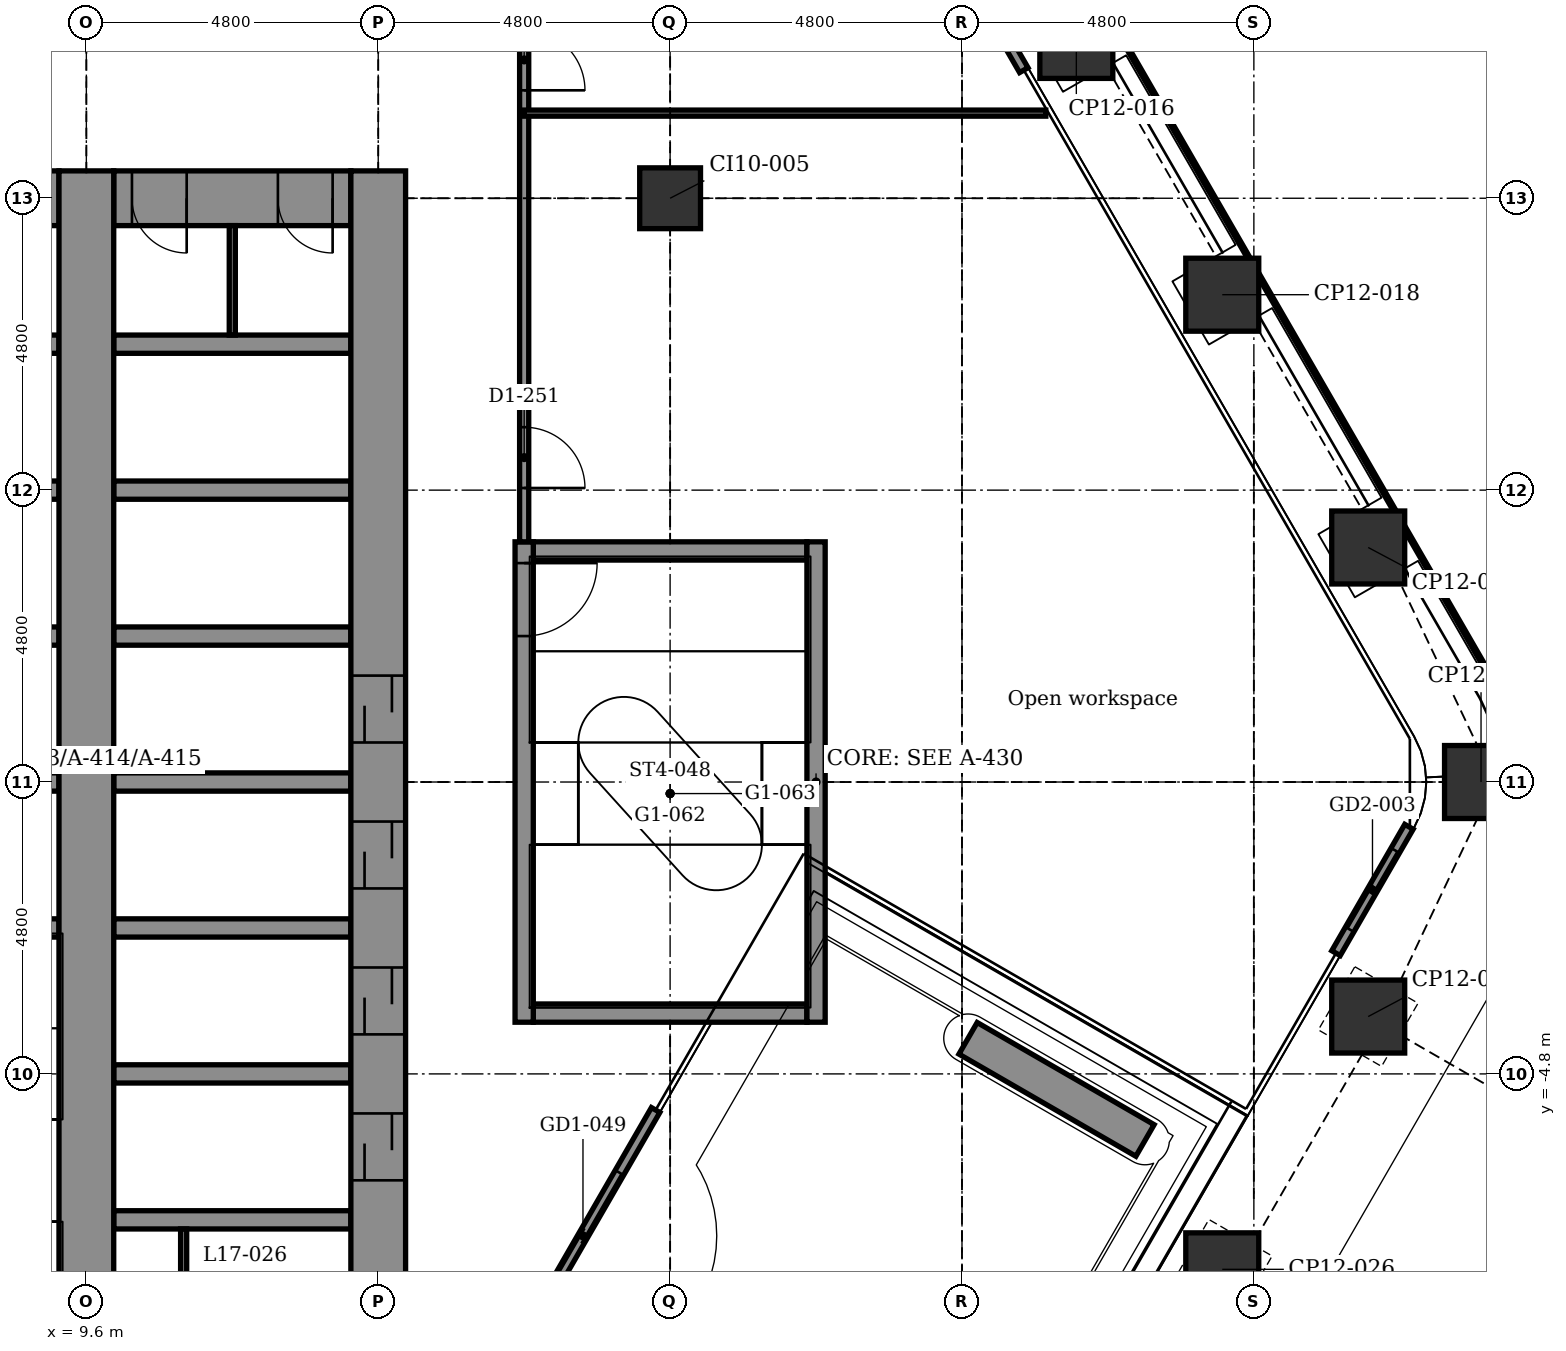
"""IFC4 building model, lengths in metres.
Left out: names, types, materials, properties, quantities, classifications, styles, units other than length and angle.
Written with IfcOpenShell. Run it as: python <this file> out.ifc"""

import sys

from ifc_helpers import new_model, si_unit, direction, frame, frame_2d, origin, origin_2d, place, context, subcontext, project, spatial, rectangle, extrude, element, fill, save


model = new_model("IFC4")
c1 = context("Model", 3, precision=1e-05, world=origin(), true_north=direction((0.0, 1.0)))
c2 = subcontext(c1, "Body", "Model", "MODEL_VIEW")
j1 = project(units=[si_unit("LENGTHUNIT", "METRE"), si_unit("PLANEANGLEUNIT", "RADIAN")], contexts=[c1])
p1 = place(None, origin())
s1 = spatial("IfcSite", under=j1, at=p1, CompositionType="ELEMENT")
p2 = place(p1, origin())
s2 = spatial("IfcBuilding", under=s1, at=p2, CompositionType="ELEMENT")
p3 = place(p2, frame((0.0, 0.0, 91.4)))
s3 = spatial("IfcBuildingStorey", under=s2, at=p3, CompositionType="ELEMENT", Elevation=91.4)
for number, where, z_axis, x_axis in (
    (1, (25.88, 12.171, -0.2), (0.0, 0.0, 1.0), (0.866, 0.5, 0.0)),
    (2, (28.28, 8.014, -0.2), (0.0, 0.0, 1.0), (0.866, 0.5, 0.0)),
    (3, (30.68, 3.857, -0.2), (0.0, 0.0, 1.0), (0.866, 0.5, 0.0)),
    (4, (32.536, 0.0, -0.2), (0.0, 0.0, 1.0), (1.0, 0.0, 0.0)),
    (5, (30.68, -3.857, -0.2), (0.0, 0.0, 1.0), (0.5, 0.866, 0.0)),
    (6, (28.28, -8.014, -0.2), (0.0, 0.0, 1.0), (0.5, 0.866, 0.0)),
):
    element("IfcColumn", number, at=place(p3, frame(where, z_axis=z_axis, x_axis=x_axis)), inside=s3, PredefinedType="COLUMN", context=c2, shape_type="SweptSolid", body=[
        extrude(rectangle(XDim=1.2, YDim=1.2, at=origin_2d()), origin(), (0.0, 0.0, 1.0), 4.5),
    ])
p4 = place(p3, frame((19.2, 9.6, -0.2), z_axis=(0.0, 0.0, 1.0), x_axis=(1.0, 0.0, 0.0)))
e7 = element("IfcColumn", 7, at=p4, inside=s3, PredefinedType="COLUMN", context=c2, shape_type="SweptSolid", body=[
    extrude(rectangle(XDim=1.0, YDim=1.0, at=origin_2d()), origin(), (0.0, 0.0, 1.0), 4.5),
])
for number, where, z_axis, x_axis in (
    (8, (10.05, -7.2, -0.2), (0.0, 0.0, 1.0), (1.0, 0.0, 0.0)),
    (9, (10.05, -4.8, -0.2), (0.0, 0.0, 1.0), (1.0, 0.0, 0.0)),
):
    element("IfcWall", number, at=place(p3, frame(where, z_axis=z_axis, x_axis=x_axis)), inside=s3, PredefinedType="STANDARD", context=c2, shape_type="SweptSolid", body=[
        extrude(rectangle(XDim=3.9, YDim=0.3, at=frame_2d((1.95, 0.0))), origin(), (0.0, 0.0, 1.0), 4.5),
    ])
p5 = place(p3, frame((16.95, -3.8, -0.2), z_axis=(0.0, 0.0, 1.0), x_axis=(1.0, 0.0, 0.0)))
e10 = element("IfcWall", 10, at=p5, inside=s3, PredefinedType="STANDARD", context=c2, shape_type="SweptSolid", body=[
    extrude(rectangle(XDim=4.5, YDim=0.3, at=frame_2d((2.25, 0.0))), origin(), (0.0, 0.0, 1.0), 4.5),
])
p6 = place(p3, frame((6.15, -2.4, -0.2), z_axis=(0.0, 0.0, 1.0), x_axis=(1.0, 0.0, 0.0)))
e11 = element("IfcWall", 11, at=p6, inside=s3, PredefinedType="STANDARD", context=c2, shape_type="SweptSolid", body=[
    extrude(rectangle(XDim=3.0, YDim=0.3, at=frame_2d((1.5, 0.0))), origin(), (0.0, 0.0, 1.0), 4.5),
])
p7 = place(p3, frame((10.05, -2.4, -0.2), z_axis=(0.0, 0.0, 1.0), x_axis=(1.0, 0.0, 0.0)))
e12 = element("IfcWall", 12, at=p7, inside=s3, PredefinedType="STANDARD", context=c2, shape_type="SweptSolid", body=[
    extrude(rectangle(XDim=3.9, YDim=0.3, at=frame_2d((1.95, 0.0))), origin(), (0.0, 0.0, 1.0), 4.5),
])
p8 = place(p3, frame((6.15, 0.0, -0.2), z_axis=(0.0, 0.0, 1.0), x_axis=(1.0, 0.0, 0.0)))
e13 = element("IfcWall", 13, at=p8, inside=s3, PredefinedType="STANDARD", context=c2, shape_type="SweptSolid", body=[
    extrude(rectangle(XDim=3.0, YDim=0.3, at=frame_2d((1.5, 0.0))), origin(), (0.0, 0.0, 1.0), 4.5),
])
p9 = place(p3, frame((10.05, 0.0, -0.2), z_axis=(0.0, 0.0, 1.0), x_axis=(1.0, 0.0, 0.0)))
e14 = element("IfcWall", 14, at=p9, inside=s3, PredefinedType="STANDARD", context=c2, shape_type="SweptSolid", body=[
    extrude(rectangle(XDim=3.9, YDim=0.3, at=frame_2d((1.95, 0.0))), origin(), (0.0, 0.0, 1.0), 4.5),
])
p10 = place(p3, frame((6.15, 2.4, -0.2), z_axis=(0.0, 0.0, 1.0), x_axis=(1.0, 0.0, 0.0)))
e15 = element("IfcWall", 15, at=p10, inside=s3, PredefinedType="STANDARD", context=c2, shape_type="SweptSolid", body=[
    extrude(rectangle(XDim=3.0, YDim=0.3, at=frame_2d((1.5, 0.0))), origin(), (0.0, 0.0, 1.0), 4.5),
])
p11 = place(p3, frame((10.05, 2.4, -0.2), z_axis=(0.0, 0.0, 1.0), x_axis=(1.0, 0.0, 0.0)))
e16 = element("IfcWall", 16, at=p11, inside=s3, PredefinedType="STANDARD", context=c2, shape_type="SweptSolid", body=[
    extrude(rectangle(XDim=3.9, YDim=0.3, at=frame_2d((1.95, 0.0))), origin(), (0.0, 0.0, 1.0), 4.5),
])
p12 = place(p3, frame((16.95, 3.8, -0.2), z_axis=(0.0, 0.0, 1.0), x_axis=(1.0, 0.0, 0.0)))
e17 = element("IfcWall", 17, at=p12, inside=s3, PredefinedType="STANDARD", context=c2, shape_type="SweptSolid", body=[
    extrude(rectangle(XDim=4.5, YDim=0.3, at=frame_2d((2.25, 0.0))), origin(), (0.0, 0.0, 1.0), 4.5),
])
p13 = place(p3, frame((6.15, 4.8, -0.2), z_axis=(0.0, 0.0, 1.0), x_axis=(1.0, 0.0, 0.0)))
e18 = element("IfcWall", 18, at=p13, inside=s3, PredefinedType="STANDARD", context=c2, shape_type="SweptSolid", body=[
    extrude(rectangle(XDim=3.0, YDim=0.3, at=frame_2d((1.5, 0.0))), origin(), (0.0, 0.0, 1.0), 4.5),
])
p14 = place(p3, frame((10.05, 4.8, -0.2), z_axis=(0.0, 0.0, 1.0), x_axis=(1.0, 0.0, 0.0)))
e19 = element("IfcWall", 19, at=p14, inside=s3, PredefinedType="STANDARD", context=c2, shape_type="SweptSolid", body=[
    extrude(rectangle(XDim=3.9, YDim=0.3, at=frame_2d((1.95, 0.0))), origin(), (0.0, 0.0, 1.0), 4.5),
])
p15 = place(p3, frame((6.0, 7.2, -0.2), z_axis=(0.0, 0.0, 1.0), x_axis=(1.0, 0.0, 0.0)))
e20 = element("IfcWall", 20, at=p15, inside=s3, PredefinedType="STANDARD", context=c2, shape_type="SweptSolid", body=[
    extrude(rectangle(XDim=3.15, YDim=0.3, at=frame_2d((1.575, 0.0))), origin(), (0.0, 0.0, 1.0), 4.5),
])
p16 = place(p3, frame((10.05, 7.2, -0.2), z_axis=(0.0, 0.0, 1.0), x_axis=(1.0, 0.0, 0.0)))
e21 = element("IfcWall", 21, at=p16, inside=s3, PredefinedType="STANDARD", context=c2, shape_type="SweptSolid", body=[
    extrude(rectangle(XDim=3.9, YDim=0.3, at=frame_2d((1.95, 0.0))), origin(), (0.0, 0.0, 1.0), 4.5),
])
p17 = place(p3, frame((-5.25, 9.6, -0.2), z_axis=(0.0, 0.0, 1.0), x_axis=(1.0, 0.0, 0.0)))
e22 = element("IfcWall", 22, at=p17, inside=s3, PredefinedType="SHEAR", context=c2, shape_type="SweptSolid", body=[
    extrude(rectangle(XDim=14.4, YDim=0.9, at=frame_2d((7.2, 0.0))), origin(), (0.0, 0.0, 1.0), 4.5),
])
p18 = place(p17, frame((9.35, 0.0, 0.2)))
e23 = element("IfcOpeningElement", 23, at=p18, cuts=e22, PredefinedType="OPENING", context=c2, shape_type="SweptSolid", body=[
    extrude(rectangle(XDim=1.4, YDim=2.1, at=frame_2d((0.7, 1.05))), frame((0.0, 0.46, 0.0), z_axis=(0.0, -1.0, 0.0), x_axis=(1.0, 0.0, 0.0)), (0.0, 0.0, 1.0), 0.92),
])
p19 = place(p3, frame((10.05, 9.6, -0.2), z_axis=(0.0, 0.0, 1.0), x_axis=(1.0, 0.0, 0.0)))
e24 = element("IfcWall", 24, at=p19, inside=s3, PredefinedType="SHEAR", context=c2, shape_type="SweptSolid", body=[
    extrude(rectangle(XDim=3.9, YDim=0.9, at=frame_2d((1.95, 0.0))), origin(), (0.0, 0.0, 1.0), 4.5),
])
p20 = place(p19, frame((0.3, 0.0, 0.2)))
e25 = element("IfcOpeningElement", 25, at=p20, cuts=e24, PredefinedType="OPENING", context=c2, shape_type="SweptSolid", body=[
    extrude(rectangle(XDim=0.9, YDim=2.1, at=frame_2d((0.45, 1.05))), frame((0.0, 0.46, 0.0), z_axis=(0.0, -1.0, 0.0), x_axis=(1.0, 0.0, 0.0)), (0.0, 0.0, 1.0), 0.92),
])
p21 = place(p19, frame((2.7, 0.0, 0.2)))
e26 = element("IfcOpeningElement", 26, at=p21, cuts=e24, PredefinedType="OPENING", context=c2, shape_type="SweptSolid", body=[
    extrude(rectangle(XDim=0.9, YDim=2.1, at=frame_2d((0.45, 1.05))), frame((0.0, 0.46, 0.0), z_axis=(0.0, -1.0, 0.0), x_axis=(1.0, 0.0, 0.0)), (0.0, 0.0, 1.0), 0.92),
])
p22 = place(p3, frame((9.6, -10.15, -0.2), z_axis=(0.0, 0.0, 1.0), x_axis=(0.0, 1.0, 0.0)))
e27 = element("IfcWall", 27, at=p22, inside=s3, PredefinedType="SHEAR", context=c2, shape_type="SweptSolid", body=[
    extrude(rectangle(XDim=20.2, YDim=0.9, at=frame_2d((10.1, 0.0))), origin(), (0.0, 0.0, 1.0), 4.5),
])
p23 = place(p3, frame((14.4, -10.05, -0.2), z_axis=(0.0, 0.0, 1.0), x_axis=(0.0, 1.0, 0.0)))
e28 = element("IfcWall", 28, at=p23, inside=s3, PredefinedType="SHEAR", context=c2, shape_type="SweptSolid", body=[
    extrude(rectangle(XDim=20.1, YDim=0.9, at=frame_2d((10.05, 0.0))), origin(), (0.0, 0.0, 1.0), 4.5),
])
p24 = place(p23, frame((3.5, 0.0, 0.2)))
e29 = element("IfcOpeningElement", 29, at=p24, cuts=e28, PredefinedType="OPENING", context=c2, shape_type="SweptSolid", body=[
    extrude(rectangle(XDim=1.1, YDim=2.1, at=frame_2d((0.55, 1.05))), frame((0.0, 0.46, 0.0), z_axis=(0.0, -1.0, 0.0), x_axis=(1.0, 0.0, 0.0)), (0.0, 0.0, 1.0), 0.92),
])
p25 = place(p23, frame((5.9, 0.0, 0.2)))
e30 = element("IfcOpeningElement", 30, at=p25, cuts=e28, PredefinedType="OPENING", context=c2, shape_type="SweptSolid", body=[
    extrude(rectangle(XDim=1.1, YDim=2.1, at=frame_2d((0.55, 1.05))), frame((0.0, 0.46, 0.0), z_axis=(0.0, -1.0, 0.0), x_axis=(1.0, 0.0, 0.0)), (0.0, 0.0, 1.0), 0.92),
])
p26 = place(p23, frame((8.3, 0.0, 0.2)))
e31 = element("IfcOpeningElement", 31, at=p26, cuts=e28, PredefinedType="OPENING", context=c2, shape_type="SweptSolid", body=[
    extrude(rectangle(XDim=1.1, YDim=2.1, at=frame_2d((0.55, 1.05))), frame((0.0, 0.46, 0.0), z_axis=(0.0, -1.0, 0.0), x_axis=(1.0, 0.0, 0.0)), (0.0, 0.0, 1.0), 0.92),
])
p27 = place(p23, frame((10.7, 0.0, 0.2)))
e32 = element("IfcOpeningElement", 32, at=p27, cuts=e28, PredefinedType="OPENING", context=c2, shape_type="SweptSolid", body=[
    extrude(rectangle(XDim=1.1, YDim=2.1, at=frame_2d((0.55, 1.05))), frame((0.0, 0.46, 0.0), z_axis=(0.0, -1.0, 0.0), x_axis=(1.0, 0.0, 0.0)), (0.0, 0.0, 1.0), 0.92),
])
p28 = place(p3, frame((16.8, -3.95, -0.2), z_axis=(0.0, 0.0, 1.0), x_axis=(0.0, 1.0, 0.0)))
e33 = element("IfcWall", 33, at=p28, inside=s3, PredefinedType="STANDARD", context=c2, shape_type="SweptSolid", body=[
    extrude(rectangle(XDim=7.9, YDim=0.3, at=frame_2d((3.95, 0.0))), origin(), (0.0, 0.0, 1.0), 4.5),
])
p29 = place(p28, frame((6.35, 0.0, 0.2)))
e34 = element("IfcOpeningElement", 34, at=p29, cuts=e33, PredefinedType="OPENING", context=c2, shape_type="SweptSolid", body=[
    extrude(rectangle(XDim=1.2, YDim=2.1, at=frame_2d((0.6, 1.05))), frame((0.0, 0.16, 0.0), z_axis=(0.0, -1.0, 0.0), x_axis=(1.0, 0.0, 0.0)), (0.0, 0.0, 1.0), 0.32),
])
p30 = place(p3, frame((21.6, -3.95, -0.2), z_axis=(0.0, 0.0, 1.0), x_axis=(0.0, 1.0, 0.0)))
e35 = element("IfcWall", 35, at=p30, inside=s3, PredefinedType="STANDARD", context=c2, shape_type="SweptSolid", body=[
    extrude(rectangle(XDim=7.9, YDim=0.3, at=frame_2d((3.95, 0.0))), origin(), (0.0, 0.0, 1.0), 4.5),
])
p31 = place(p3, frame((22.647, 15.812, 0.0), z_axis=(0.0, 0.0, 1.0), x_axis=(0.499978080042, -0.866038058908, 0.0)))
e36 = element("IfcWall", 36, at=p31, inside=s3, PredefinedType="PARTITIONING", context=c2, shape_type="SweptSolid", body=[
    extrude(rectangle(XDim=4.74, YDim=0.16, at=frame_2d((2.37, 0.0))), origin(), (0.0, 0.0, 1.0), 4.3),
])
p32 = place(p31, frame((1.17, 0.0, 0.0)))
e37 = element("IfcOpeningElement", 37, at=p32, cuts=e36, PredefinedType="OPENING", context=c2, shape_type="SweptSolid", body=[
    extrude(rectangle(XDim=2.4, YDim=2.4, at=frame_2d((1.2, 1.2))), frame((0.0, 0.09, 0.0), z_axis=(0.0, -1.0, 0.0), x_axis=(1.0, 0.0, 0.0)), (0.0, 0.0, 1.0), 0.18),
])
p33 = place(p3, frame((31.351, -0.736, 0.0), z_axis=(0.0, 0.0, 1.0), x_axis=(-0.500001309137, -0.866024647952, 0.0)))
e38 = element("IfcWall", 38, at=p33, inside=s3, PredefinedType="PARTITIONING", context=c2, shape_type="SweptSolid", body=[
    extrude(rectangle(XDim=2.4, YDim=0.16, at=frame_2d((1.2, 0.0))), origin(), (0.0, 0.0, 1.0), 4.3),
])
p34 = place(p33, frame((0.45, 0.0, 0.0)))
e39 = element("IfcOpeningElement", 39, at=p34, cuts=e38, PredefinedType="OPENING", context=c2, shape_type="SweptSolid", body=[
    extrude(rectangle(XDim=1.5, YDim=2.4, at=frame_2d((0.75, 1.2))), frame((0.0, 0.09, 0.0), z_axis=(0.0, -1.0, 0.0), x_axis=(1.0, 0.0, 0.0)), (0.0, 0.0, 1.0), 0.18),
])
p35 = place(p3, frame((18.962, -5.394, 0.0), z_axis=(0.0, 0.0, 1.0), x_axis=(-0.500017192868, -0.86601547725, 0.0)))
e40 = element("IfcWall", 40, at=p35, inside=s3, PredefinedType="PARTITIONING", context=c2, shape_type="SweptSolid", body=[
    extrude(rectangle(XDim=4.78, YDim=0.16, at=frame_2d((2.39, 0.0))), origin(), (0.0, 0.0, 1.0), 4.3),
])
p36 = place(p35, frame((1.19, 0.0, 0.0)))
e41 = element("IfcOpeningElement", 41, at=p36, cuts=e40, PredefinedType="OPENING", context=c2, shape_type="SweptSolid", body=[
    extrude(rectangle(XDim=2.4, YDim=2.4, at=frame_2d((1.2, 1.2))), frame((0.0, 0.09, 0.0), z_axis=(0.0, -1.0, 0.0), x_axis=(1.0, 0.0, 0.0)), (0.0, 0.0, 1.0), 0.18),
])
p37 = place(p3, frame((24.1, -4.215, 0.0), z_axis=(0.0, 0.0, 1.0), x_axis=(0.866039179741, -0.499976138585, 0.0)))
e42 = element("IfcWall", 42, at=p37, inside=s3, PredefinedType="USERDEFINED", context=c2, shape_type="SweptSolid", body=[
    extrude(rectangle(XDim=3.36, YDim=0.6, at=frame_2d((1.68, 0.0))), origin(), (0.0, 0.0, 1.0), 0.7),
])
p38 = place(p3, frame((16.8, 3.95, 0.0), z_axis=(0.0, 0.0, 1.0), x_axis=(0.0, 1.0, 0.0)))
e43 = element("IfcWall", 43, at=p38, inside=s3, PredefinedType="PARTITIONING", context=c2, shape_type="SweptSolid", body=[
    extrude(rectangle(XDim=8.75, YDim=0.15, at=frame_2d((4.375, 0.0))), origin(), (0.0, 0.0, 1.0), 4.3),
])
p39 = place(p38, frame((7.425, 0.0, 0.0)))
e44 = element("IfcOpeningElement", 44, at=p39, cuts=e43, PredefinedType="OPENING", context=c2, shape_type="SweptSolid", body=[
    extrude(rectangle(XDim=1.0, YDim=2.1, at=frame_2d((0.5, 1.05))), frame((0.0, 0.085, 0.0), z_axis=(0.0, -1.0, 0.0), x_axis=(1.0, 0.0, 0.0)), (0.0, 0.0, 1.0), 0.17),
])
p40 = place(p38, frame((0.885, 0.0, 0.0)))
e45 = element("IfcOpeningElement", 45, at=p40, cuts=e43, PredefinedType="OPENING", context=c2, shape_type="SweptSolid", body=[
    extrude(rectangle(XDim=1.0, YDim=2.1, at=frame_2d((0.5, 1.05))), frame((0.0, 0.085, 0.0), z_axis=(0.0, -1.0, 0.0), x_axis=(1.0, 0.0, 0.0)), (0.0, 0.0, 1.0), 0.17),
])
for number, where, z_axis, x_axis in (
    (46, (12.0, 7.35, 0.0), (0.0, 0.0, 1.0), (0.0, 1.0, 0.0)),
    (47, (11.2, -9.15, 0.0), (0.0, 0.0, 1.0), (0.0, 1.0, 0.0)),
):
    element("IfcWall", number, at=place(p3, frame(where, z_axis=z_axis, x_axis=x_axis)), inside=s3, PredefinedType="PARTITIONING", context=c2, shape_type="SweptSolid", body=[
        extrude(rectangle(XDim=1.8, YDim=0.1, at=frame_2d((0.9, 0.0))), origin(), (0.0, 0.0, 1.0), 4.3),
    ])
p41 = place(p3, frame((16.8, 11.0, 0.0), z_axis=(0.0, 0.0, 1.0), x_axis=(1.0, 0.0, 0.0)))
e48 = element("IfcWall", 48, at=p41, inside=s3, PredefinedType="PARTITIONING", context=c2, shape_type="SweptSolid", body=[
    extrude(rectangle(XDim=8.578, YDim=0.1, at=frame_2d((4.289, 0.0))), origin(), (0.0, 0.0, 1.0), 4.3),
])
p42 = place(p34, origin())
e49 = element("IfcDoor", 49, at=p42, inside=s3, OperationType="DOUBLE_DOOR_SLIDING", PredefinedType="DOOR", context=c2, shape_type="SweptSolid", body=[
    extrude(rectangle(XDim=1.5, YDim=2.4, at=frame_2d((0.75, 1.2))), frame((0.0, 0.025, 0.0), z_axis=(0.0, -1.0, 0.0), x_axis=(1.0, 0.0, 0.0)), (0.0, 0.0, 1.0), 0.05),
])
fill(e39, e49)
p43 = place(p36, origin())
e50 = element("IfcDoor", 50, at=p43, inside=s3, OperationType="DOUBLE_DOOR_SLIDING", PredefinedType="DOOR", context=c2, shape_type="SweptSolid", body=[
    extrude(rectangle(XDim=2.4, YDim=2.4, at=frame_2d((1.2, 1.2))), frame((0.0, 0.025, 0.0), z_axis=(0.0, -1.0, 0.0), x_axis=(1.0, 0.0, 0.0)), (0.0, 0.0, 1.0), 0.05),
])
fill(e41, e50)
p44 = place(p39, frame((1.0, 0.0, 0.0), z_axis=(0.0, 0.0, 1.0), x_axis=(-1.0, 0.0, 0.0)))
e51 = element("IfcDoor", 51, at=p44, inside=s3, OperationType="SINGLE_SWING_LEFT", PredefinedType="DOOR", context=c2, shape_type="SweptSolid", body=[
    extrude(rectangle(XDim=1.0, YDim=2.1, at=frame_2d((0.5, 1.05))), frame((0.0, 0.025, 0.0), z_axis=(0.0, -1.0, 0.0), x_axis=(1.0, 0.0, 0.0)), (0.0, 0.0, 1.0), 0.05),
])
fill(e44, e51)
p45 = place(p40, frame((1.0, 0.0, 0.0), z_axis=(0.0, 0.0, 1.0), x_axis=(-1.0, 0.0, 0.0)))
e52 = element("IfcDoor", 52, at=p45, inside=s3, OperationType="SINGLE_SWING_LEFT", PredefinedType="DOOR", context=c2, shape_type="SweptSolid", body=[
    extrude(rectangle(XDim=1.0, YDim=2.1, at=frame_2d((0.5, 1.05))), frame((0.0, 0.025, 0.0), z_axis=(0.0, -1.0, 0.0), x_axis=(1.0, 0.0, 0.0)), (0.0, 0.0, 1.0), 0.05),
])
fill(e45, e52)
p46 = place(p24, origin())
e53 = element("IfcDoor", 53, at=p46, inside=s3, OperationType="DOUBLE_DOOR_SLIDING", PredefinedType="DOOR", context=c2, shape_type="SweptSolid", body=[
    extrude(rectangle(XDim=1.1, YDim=2.1, at=frame_2d((0.55, 1.05))), frame((0.0, 0.025, 0.0), z_axis=(0.0, -1.0, 0.0), x_axis=(1.0, 0.0, 0.0)), (0.0, 0.0, 1.0), 0.05),
])
fill(e29, e53)
p47 = place(p25, origin())
e54 = element("IfcDoor", 54, at=p47, inside=s3, OperationType="DOUBLE_DOOR_SLIDING", PredefinedType="DOOR", context=c2, shape_type="SweptSolid", body=[
    extrude(rectangle(XDim=1.1, YDim=2.1, at=frame_2d((0.55, 1.05))), frame((0.0, 0.025, 0.0), z_axis=(0.0, -1.0, 0.0), x_axis=(1.0, 0.0, 0.0)), (0.0, 0.0, 1.0), 0.05),
])
fill(e30, e54)
p48 = place(p26, origin())
e55 = element("IfcDoor", 55, at=p48, inside=s3, OperationType="DOUBLE_DOOR_SLIDING", PredefinedType="DOOR", context=c2, shape_type="SweptSolid", body=[
    extrude(rectangle(XDim=1.1, YDim=2.1, at=frame_2d((0.55, 1.05))), frame((0.0, 0.025, 0.0), z_axis=(0.0, -1.0, 0.0), x_axis=(1.0, 0.0, 0.0)), (0.0, 0.0, 1.0), 0.05),
])
fill(e31, e55)
p49 = place(p27, origin())
e56 = element("IfcDoor", 56, at=p49, inside=s3, OperationType="DOUBLE_DOOR_SLIDING", PredefinedType="DOOR", context=c2, shape_type="SweptSolid", body=[
    extrude(rectangle(XDim=1.1, YDim=2.1, at=frame_2d((0.55, 1.05))), frame((0.0, 0.025, 0.0), z_axis=(0.0, -1.0, 0.0), x_axis=(1.0, 0.0, 0.0)), (0.0, 0.0, 1.0), 0.05),
])
fill(e32, e56)
p50 = place(p29, frame((1.2, 0.0, 0.0), z_axis=(0.0, 0.0, 1.0), x_axis=(-1.0, 0.0, 0.0)))
e57 = element("IfcDoor", 57, at=p50, inside=s3, OperationType="SINGLE_SWING_RIGHT", PredefinedType="DOOR", context=c2, shape_type="SweptSolid", body=[
    extrude(rectangle(XDim=1.2, YDim=2.1, at=frame_2d((0.6, 1.05))), frame((0.0, 0.025, 0.0), z_axis=(0.0, -1.0, 0.0), x_axis=(1.0, 0.0, 0.0)), (0.0, 0.0, 1.0), 0.05),
])
fill(e34, e57)
p51 = place(p20, frame((0.9, 0.0, 0.0), z_axis=(0.0, 0.0, 1.0), x_axis=(-1.0, 0.0, 0.0)))
e58 = element("IfcDoor", 58, at=p51, inside=s3, OperationType="SINGLE_SWING_RIGHT", PredefinedType="DOOR", context=c2, shape_type="SweptSolid", body=[
    extrude(rectangle(XDim=0.9, YDim=2.1, at=frame_2d((0.45, 1.05))), frame((0.0, 0.025, 0.0), z_axis=(0.0, -1.0, 0.0), x_axis=(1.0, 0.0, 0.0)), (0.0, 0.0, 1.0), 0.05),
])
fill(e25, e58)
p52 = place(p21, frame((0.9, 0.0, 0.0), z_axis=(0.0, 0.0, 1.0), x_axis=(-1.0, 0.0, 0.0)))
e59 = element("IfcDoor", 59, at=p52, inside=s3, OperationType="SINGLE_SWING_RIGHT", PredefinedType="DOOR", context=c2, shape_type="SweptSolid", body=[
    extrude(rectangle(XDim=0.9, YDim=2.1, at=frame_2d((0.45, 1.05))), frame((0.0, 0.025, 0.0), z_axis=(0.0, -1.0, 0.0), x_axis=(1.0, 0.0, 0.0)), (0.0, 0.0, 1.0), 0.05),
])
fill(e26, e59)
save(model, sys.argv[1])
